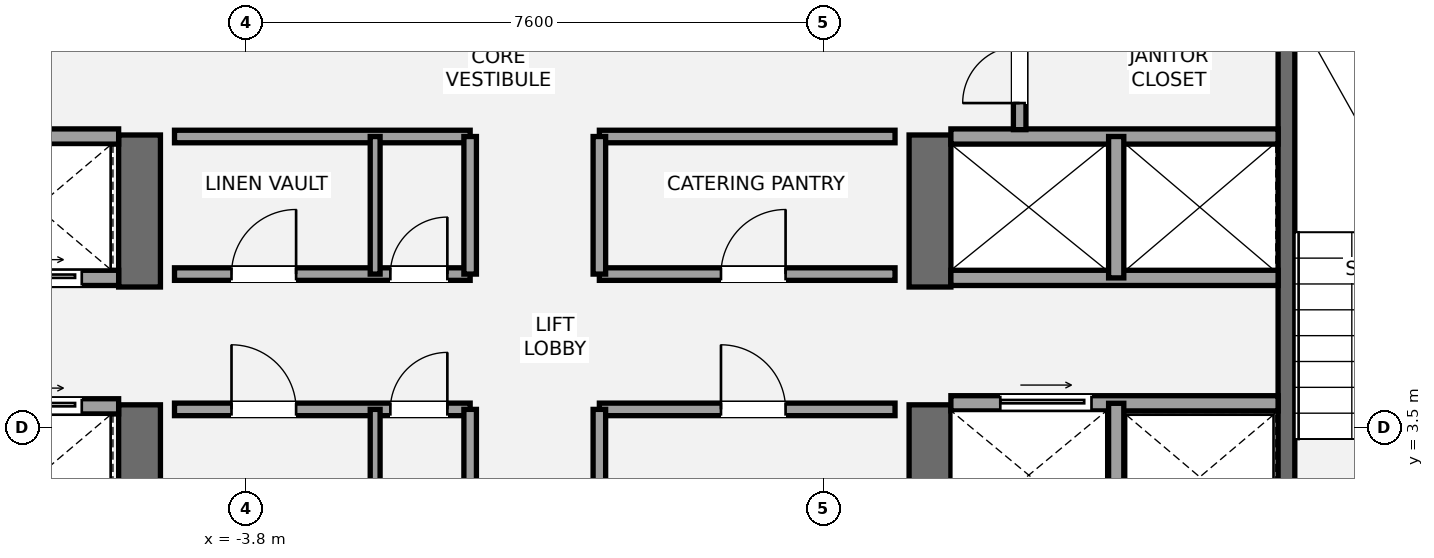
"""IFC4 building model, lengths in metres.
Left out: names, types, materials, properties, quantities, classifications, styles, units other than length and angle.
Written with IfcOpenShell. Run it as: python <this file> out.ifc"""

import sys

from ifc_helpers import new_model, si_unit, direction, frame, frame_2d, origin, place, context, subcontext, project, spatial, rectangle, extrude, element, fill, save


model = new_model("IFC4")
c1 = context("Model", 3, precision=1e-05, world=origin(), true_north=direction((0.0, 1.0)))
c2 = subcontext(c1, "Body", "Model", "MODEL_VIEW")
j1 = project(units=[si_unit("LENGTHUNIT", "METRE"), si_unit("PLANEANGLEUNIT", "RADIAN")], contexts=[c1])
p1 = place(None, origin())
s1 = spatial("IfcSite", under=j1, at=p1, CompositionType="ELEMENT")
p2 = place(p1, origin())
s2 = spatial("IfcBuilding", under=s1, at=p2, CompositionType="ELEMENT")
p3 = place(p2, frame((0.0, 0.0, 244.65)))
s3 = spatial("IfcBuildingStorey", under=s2, at=p3, CompositionType="ELEMENT", Elevation=244.65)
p4 = place(p3, frame((-5.2, 1.3, 0.0), z_axis=(0.0, 0.0, 1.0), x_axis=(0.0, 1.0, 0.0)))
e1 = element("IfcWall", 1, at=p4, inside=s3, PredefinedType="SHEAR", context=c2, shape_type="SweptSolid", body=[
    extrude(rectangle(XDim=2.5, YDim=0.55, at=frame_2d((1.25, 0.0))), origin(), (0.0, 0.0, 1.0), 3.15),
])
p5 = place(p3, frame((-5.2, 5.35, 0.0), z_axis=(0.0, 0.0, 1.0), x_axis=(0.0, 1.0, 0.0)))
e2 = element("IfcWall", 2, at=p5, inside=s3, PredefinedType="SHEAR", context=c2, shape_type="SweptSolid", body=[
    extrude(rectangle(XDim=2.0, YDim=0.55, at=frame_2d((1.0, 0.0))), origin(), (0.0, 0.0, 1.0), 3.15),
])
p6 = place(p3, frame((5.2, 1.3, 0.0), z_axis=(0.0, 0.0, 1.0), x_axis=(0.0, 1.0, 0.0)))
e3 = element("IfcWall", 3, at=p6, inside=s3, PredefinedType="SHEAR", context=c2, shape_type="SweptSolid", body=[
    extrude(rectangle(XDim=2.5, YDim=0.55, at=frame_2d((1.25, 0.0))), origin(), (0.0, 0.0, 1.0), 3.15),
])
p7 = place(p3, frame((5.2, 5.35, 0.0), z_axis=(0.0, 0.0, 1.0), x_axis=(0.0, 1.0, 0.0)))
e4 = element("IfcWall", 4, at=p7, inside=s3, PredefinedType="SHEAR", context=c2, shape_type="SweptSolid", body=[
    extrude(rectangle(XDim=2.0, YDim=0.55, at=frame_2d((1.0, 0.0))), origin(), (0.0, 0.0, 1.0), 3.15),
])
p8 = place(p3, frame((9.89, 1.85, 0.0), z_axis=(0.0, 0.0, 1.0), x_axis=(0.0, 1.0, 0.0)))
e5 = element("IfcWall", 5, at=p8, inside=s3, PredefinedType="SHEAR", context=c2, shape_type="SweptSolid", body=[
    extrude(rectangle(XDim=7.15, YDim=0.22, at=frame_2d((3.575, 0.0))), origin(), (0.0, 0.0, 1.0), 3.15),
])
p9 = place(p3, frame((-9.78, 3.78, 0.0), z_axis=(0.0, 0.0, 1.0), x_axis=(1.0, 0.0, 0.0)))
e6 = element("IfcWall", 6, at=p9, inside=s3, PredefinedType="SOLIDWALL", context=c2, shape_type="SweptSolid", body=[
    extrude(rectangle(XDim=4.305, YDim=0.2, at=frame_2d((2.152, 0.0))), origin(), (0.0, 0.0, 1.0), 2.97),
])
p10 = place(p9, frame((2.72, 0.0, 0.0)))
e7 = element("IfcOpeningElement", 7, at=p10, cuts=e6, PredefinedType="OPENING", context=c2, shape_type="SweptSolid", body=[
    extrude(rectangle(XDim=1.1, YDim=2.2, at=frame_2d((0.55, 1.1))), frame((0.0, 0.11, 0.0), z_axis=(0.0, -1.0, 0.0), x_axis=(1.0, 0.0, 0.0)), (0.0, 0.0, 1.0), 0.22),
])
p11 = place(p3, frame((-9.78, 5.47, 0.0), z_axis=(0.0, 0.0, 1.0), x_axis=(1.0, 0.0, 0.0)))
e8 = element("IfcWall", 8, at=p11, inside=s3, PredefinedType="SOLIDWALL", context=c2, shape_type="SweptSolid", body=[
    extrude(rectangle(XDim=4.305, YDim=0.2, at=frame_2d((2.152, 0.0))), origin(), (0.0, 0.0, 1.0), 2.97),
])
p12 = place(p11, frame((0.55, 0.0, 0.0)))
e9 = element("IfcOpeningElement", 9, at=p12, cuts=e8, PredefinedType="OPENING", context=c2, shape_type="SweptSolid", body=[
    extrude(rectangle(XDim=1.1, YDim=2.2, at=frame_2d((0.55, 1.1))), frame((0.0, 0.11, 0.0), z_axis=(0.0, -1.0, 0.0), x_axis=(1.0, 0.0, 0.0)), (0.0, 0.0, 1.0), 0.22),
])
p13 = place(p11, frame((2.72, 0.0, 0.0)))
e10 = element("IfcOpeningElement", 10, at=p13, cuts=e8, PredefinedType="OPENING", context=c2, shape_type="SweptSolid", body=[
    extrude(rectangle(XDim=1.1, YDim=2.2, at=frame_2d((0.55, 1.1))), frame((0.0, 0.11, 0.0), z_axis=(0.0, -1.0, 0.0), x_axis=(1.0, 0.0, 0.0)), (0.0, 0.0, 1.0), 0.22),
])
p14 = place(p3, frame((-9.78, 7.33, 0.0), z_axis=(0.0, 0.0, 1.0), x_axis=(1.0, 0.0, 0.0)))
e11 = element("IfcWall", 11, at=p14, inside=s3, PredefinedType="SOLIDWALL", context=c2, shape_type="SweptSolid", body=[
    extrude(rectangle(XDim=4.305, YDim=0.2, at=frame_2d((2.152, 0.0))), origin(), (0.0, 0.0, 1.0), 2.97),
])
p15 = place(p3, frame((5.475, 3.82, 0.0), z_axis=(0.0, 0.0, 1.0), x_axis=(1.0, 0.0, 0.0)))
e12 = element("IfcWall", 12, at=p15, inside=s3, PredefinedType="SOLIDWALL", context=c2, shape_type="SweptSolid", body=[
    extrude(rectangle(XDim=4.305, YDim=0.2, at=frame_2d((2.152, 0.0))), origin(), (0.0, 0.0, 1.0), 2.97),
])
p16 = place(p15, frame((0.65, 0.0, 0.0)))
e13 = element("IfcOpeningElement", 13, at=p16, cuts=e12, PredefinedType="OPENING", context=c2, shape_type="SweptSolid", body=[
    extrude(rectangle(XDim=1.2, YDim=2.2, at=frame_2d((0.6, 1.1))), frame((0.0, 0.11, 0.0), z_axis=(0.0, -1.0, 0.0), x_axis=(1.0, 0.0, 0.0)), (0.0, 0.0, 1.0), 0.22),
])
p17 = place(p3, frame((7.65, 1.85, 0.0), z_axis=(0.0, 0.0, 1.0), x_axis=(0.0, 1.0, 0.0)))
e14 = element("IfcWall", 14, at=p17, inside=s3, PredefinedType="SOLIDWALL", context=c2, shape_type="SweptSolid", body=[
    extrude(rectangle(XDim=1.97, YDim=0.2, at=frame_2d((0.985, 0.0))), origin(), (0.0, 0.0, 1.0), 2.97),
])
for number, where, z_axis, x_axis in (
    (15, (5.475, 5.47, 0.0), (0.0, 0.0, 1.0), (1.0, 0.0, 0.0)),
    (16, (5.475, 7.33, 0.0), (0.0, 0.0, 1.0), (1.0, 0.0, 0.0)),
):
    element("IfcWall", number, at=place(p3, frame(where, z_axis=z_axis, x_axis=x_axis)), inside=s3, PredefinedType="SOLIDWALL", context=c2, shape_type="SweptSolid", body=[
        extrude(rectangle(XDim=4.305, YDim=0.2, at=frame_2d((2.152, 0.0))), origin(), (0.0, 0.0, 1.0), 2.97),
    ])
p18 = place(p3, frame((7.65, 5.47, 0.0), z_axis=(0.0, 0.0, 1.0), x_axis=(0.0, 1.0, 0.0)))
e17 = element("IfcWall", 17, at=p18, inside=s3, PredefinedType="SOLIDWALL", context=c2, shape_type="SweptSolid", body=[
    extrude(rectangle(XDim=1.86, YDim=0.2, at=frame_2d((0.93, 0.0))), origin(), (0.0, 0.0, 1.0), 2.97),
])
p19 = place(p3, frame((-4.74, 3.74, 0.0), z_axis=(0.0, 0.0, 1.0), x_axis=(1.0, 0.0, 0.0)))
e18 = element("IfcWall", 18, at=p19, inside=s3, PredefinedType="PARTITIONING", context=c2, shape_type="SweptSolid", body=[
    extrude(rectangle(XDim=3.89, YDim=0.165, at=frame_2d((1.945, 0.0))), origin(), (0.0, 0.0, 1.0), 2.97),
])
p20 = place(p19, frame((0.75, 0.0, 0.0)))
e19 = element("IfcOpeningElement", 19, at=p20, cuts=e18, PredefinedType="OPENING", context=c2, shape_type="SweptSolid", body=[
    extrude(rectangle(XDim=0.85, YDim=2.1, at=frame_2d((0.425, 1.05))), frame((0.0, 0.093, 0.0), z_axis=(0.0, -1.0, 0.0), x_axis=(1.0, 0.0, 0.0)), (0.0, 0.0, 1.0), 0.185),
])
p21 = place(p19, frame((2.84, 0.0, 0.0)))
e20 = element("IfcOpeningElement", 20, at=p21, cuts=e18, PredefinedType="OPENING", context=c2, shape_type="SweptSolid", body=[
    extrude(rectangle(XDim=0.75, YDim=2.1, at=frame_2d((0.375, 1.05))), frame((0.0, 0.093, 0.0), z_axis=(0.0, -1.0, 0.0), x_axis=(1.0, 0.0, 0.0)), (0.0, 0.0, 1.0), 0.185),
])
p22 = place(p3, frame((-0.85, 1.92, 0.0), z_axis=(0.0, 0.0, 1.0), x_axis=(0.0, 1.0, 0.0)))
e21 = element("IfcWall", 21, at=p22, inside=s3, PredefinedType="PARTITIONING", context=c2, shape_type="SweptSolid", body=[
    extrude(rectangle(XDim=1.82, YDim=0.165, at=frame_2d((0.91, 0.0))), origin(), (0.0, 0.0, 1.0), 2.97),
])
p23 = place(p3, frame((0.85, 3.74, 0.0), z_axis=(0.0, 0.0, 1.0), x_axis=(1.0, 0.0, 0.0)))
e22 = element("IfcWall", 22, at=p23, inside=s3, PredefinedType="PARTITIONING", context=c2, shape_type="SweptSolid", body=[
    extrude(rectangle(XDim=3.89, YDim=0.165, at=frame_2d((1.945, 0.0))), origin(), (0.0, 0.0, 1.0), 2.97),
])
p24 = place(p23, frame((1.6, 0.0, 0.0)))
e23 = element("IfcOpeningElement", 23, at=p24, cuts=e22, PredefinedType="OPENING", context=c2, shape_type="SweptSolid", body=[
    extrude(rectangle(XDim=0.85, YDim=2.1, at=frame_2d((0.425, 1.05))), frame((0.0, 0.093, 0.0), z_axis=(0.0, -1.0, 0.0), x_axis=(1.0, 0.0, 0.0)), (0.0, 0.0, 1.0), 0.185),
])
p25 = place(p3, frame((0.85, 1.92, 0.0), z_axis=(0.0, 0.0, 1.0), x_axis=(0.0, 1.0, 0.0)))
e24 = element("IfcWall", 24, at=p25, inside=s3, PredefinedType="PARTITIONING", context=c2, shape_type="SweptSolid", body=[
    extrude(rectangle(XDim=1.82, YDim=0.165, at=frame_2d((0.91, 0.0))), origin(), (0.0, 0.0, 1.0), 2.97),
])
p26 = place(p3, frame((-2.1, 1.92, 0.0), z_axis=(0.0, 0.0, 1.0), x_axis=(0.0, 1.0, 0.0)))
e25 = element("IfcWall", 25, at=p26, inside=s3, PredefinedType="PARTITIONING", context=c2, shape_type="SweptSolid", body=[
    extrude(rectangle(XDim=1.82, YDim=0.13, at=frame_2d((0.91, 0.0))), origin(), (0.0, 0.0, 1.0), 2.97),
])
p27 = place(p3, frame((-4.74, 5.52, 0.0), z_axis=(0.0, 0.0, 1.0), x_axis=(1.0, 0.0, 0.0)))
e26 = element("IfcWall", 26, at=p27, inside=s3, PredefinedType="PARTITIONING", context=c2, shape_type="SweptSolid", body=[
    extrude(rectangle(XDim=3.89, YDim=0.165, at=frame_2d((1.945, 0.0))), origin(), (0.0, 0.0, 1.0), 2.97),
])
p28 = place(p27, frame((0.75, 0.0, 0.0)))
e27 = element("IfcOpeningElement", 27, at=p28, cuts=e26, PredefinedType="OPENING", context=c2, shape_type="SweptSolid", body=[
    extrude(rectangle(XDim=0.85, YDim=2.1, at=frame_2d((0.425, 1.05))), frame((0.0, 0.093, 0.0), z_axis=(0.0, -1.0, 0.0), x_axis=(1.0, 0.0, 0.0)), (0.0, 0.0, 1.0), 0.185),
])
p29 = place(p27, frame((2.84, 0.0, 0.0)))
e28 = element("IfcOpeningElement", 28, at=p29, cuts=e26, PredefinedType="OPENING", context=c2, shape_type="SweptSolid", body=[
    extrude(rectangle(XDim=0.75, YDim=2.1, at=frame_2d((0.375, 1.05))), frame((0.0, 0.093, 0.0), z_axis=(0.0, -1.0, 0.0), x_axis=(1.0, 0.0, 0.0)), (0.0, 0.0, 1.0), 0.185),
])
p30 = place(p3, frame((-4.74, 7.33, 0.0), z_axis=(0.0, 0.0, 1.0), x_axis=(1.0, 0.0, 0.0)))
e29 = element("IfcWall", 29, at=p30, inside=s3, PredefinedType="PARTITIONING", context=c2, shape_type="SweptSolid", body=[
    extrude(rectangle(XDim=3.89, YDim=0.165, at=frame_2d((1.945, 0.0))), origin(), (0.0, 0.0, 1.0), 2.97),
])
p31 = place(p3, frame((-0.85, 5.52, 0.0), z_axis=(0.0, 0.0, 1.0), x_axis=(0.0, 1.0, 0.0)))
e30 = element("IfcWall", 30, at=p31, inside=s3, PredefinedType="PARTITIONING", context=c2, shape_type="SweptSolid", body=[
    extrude(rectangle(XDim=1.81, YDim=0.165, at=frame_2d((0.905, 0.0))), origin(), (0.0, 0.0, 1.0), 2.97),
])
p32 = place(p3, frame((0.85, 5.52, 0.0), z_axis=(0.0, 0.0, 1.0), x_axis=(1.0, 0.0, 0.0)))
e31 = element("IfcWall", 31, at=p32, inside=s3, PredefinedType="PARTITIONING", context=c2, shape_type="SweptSolid", body=[
    extrude(rectangle(XDim=3.89, YDim=0.165, at=frame_2d((1.945, 0.0))), origin(), (0.0, 0.0, 1.0), 2.97),
])
p33 = place(p32, frame((1.6, 0.0, 0.0)))
e32 = element("IfcOpeningElement", 32, at=p33, cuts=e31, PredefinedType="OPENING", context=c2, shape_type="SweptSolid", body=[
    extrude(rectangle(XDim=0.85, YDim=2.1, at=frame_2d((0.425, 1.05))), frame((0.0, 0.093, 0.0), z_axis=(0.0, -1.0, 0.0), x_axis=(1.0, 0.0, 0.0)), (0.0, 0.0, 1.0), 0.185),
])
p34 = place(p3, frame((0.85, 7.33, 0.0), z_axis=(0.0, 0.0, 1.0), x_axis=(1.0, 0.0, 0.0)))
e33 = element("IfcWall", 33, at=p34, inside=s3, PredefinedType="PARTITIONING", context=c2, shape_type="SweptSolid", body=[
    extrude(rectangle(XDim=3.89, YDim=0.165, at=frame_2d((1.945, 0.0))), origin(), (0.0, 0.0, 1.0), 2.97),
])
p35 = place(p3, frame((0.85, 5.52, 0.0), z_axis=(0.0, 0.0, 1.0), x_axis=(0.0, 1.0, 0.0)))
e34 = element("IfcWall", 34, at=p35, inside=s3, PredefinedType="PARTITIONING", context=c2, shape_type="SweptSolid", body=[
    extrude(rectangle(XDim=1.81, YDim=0.165, at=frame_2d((0.905, 0.0))), origin(), (0.0, 0.0, 1.0), 2.97),
])
p36 = place(p3, frame((-2.1, 5.52, 0.0), z_axis=(0.0, 0.0, 1.0), x_axis=(0.0, 1.0, 0.0)))
e35 = element("IfcWall", 35, at=p36, inside=s3, PredefinedType="PARTITIONING", context=c2, shape_type="SweptSolid", body=[
    extrude(rectangle(XDim=1.81, YDim=0.13, at=frame_2d((0.905, 0.0))), origin(), (0.0, 0.0, 1.0), 2.97),
])
p37 = place(p3, frame((6.38, 7.42, 0.0), z_axis=(0.0, 0.0, 1.0), x_axis=(0.0, 1.0, 0.0)))
e36 = element("IfcWall", 36, at=p37, inside=s3, PredefinedType="PARTITIONING", context=c2, shape_type="SweptSolid", body=[
    extrude(rectangle(XDim=1.58, YDim=0.165, at=frame_2d((0.79, 0.0))), origin(), (0.0, 0.0, 1.0), 2.97),
])
p38 = place(p37, frame((0.35, 0.0, 0.0)))
e37 = element("IfcOpeningElement", 37, at=p38, cuts=e36, PredefinedType="OPENING", context=c2, shape_type="SweptSolid", body=[
    extrude(rectangle(XDim=0.75, YDim=2.1, at=frame_2d((0.375, 1.05))), frame((0.0, 0.093, 0.0), z_axis=(0.0, -1.0, 0.0), x_axis=(1.0, 0.0, 0.0)), (0.0, 0.0, 1.0), 0.185),
])
p39 = place(p13, origin())
e38 = element("IfcDoor", 38, at=p39, inside=s3, OperationType="SLIDING_TO_LEFT", PredefinedType="DOOR", context=c2, shape_type="SweptSolid", body=[
    extrude(rectangle(XDim=1.1, YDim=2.2, at=frame_2d((0.55, 1.1))), frame((0.0, 0.025, 0.0), z_axis=(0.0, -1.0, 0.0), x_axis=(1.0, 0.0, 0.0)), (0.0, 0.0, 1.0), 0.05),
])
fill(e10, e38)
p40 = place(p10, origin())
e39 = element("IfcDoor", 39, at=p40, inside=s3, OperationType="SLIDING_TO_LEFT", PredefinedType="DOOR", context=c2, shape_type="SweptSolid", body=[
    extrude(rectangle(XDim=1.1, YDim=2.2, at=frame_2d((0.55, 1.1))), frame((0.0, 0.025, 0.0), z_axis=(0.0, -1.0, 0.0), x_axis=(1.0, 0.0, 0.0)), (0.0, 0.0, 1.0), 0.05),
])
fill(e7, e39)
p41 = place(p16, origin())
e40 = element("IfcDoor", 40, at=p41, inside=s3, OperationType="SLIDING_TO_RIGHT", PredefinedType="DOOR", context=c2, shape_type="SweptSolid", body=[
    extrude(rectangle(XDim=1.2, YDim=2.2, at=frame_2d((0.6, 1.1))), frame((0.0, 0.025, 0.0), z_axis=(0.0, -1.0, 0.0), x_axis=(1.0, 0.0, 0.0)), (0.0, 0.0, 1.0), 0.05),
])
fill(e13, e40)
p42 = place(p20, origin())
e41 = element("IfcDoor", 41, at=p42, inside=s3, OperationType="SINGLE_SWING_LEFT", PredefinedType="DOOR", context=c2, shape_type="SweptSolid", body=[
    extrude(rectangle(XDim=0.85, YDim=2.1, at=frame_2d((0.425, 1.05))), frame((0.0, 0.025, 0.0), z_axis=(0.0, -1.0, 0.0), x_axis=(1.0, 0.0, 0.0)), (0.0, 0.0, 1.0), 0.05),
])
fill(e19, e41)
p43 = place(p21, origin())
e42 = element("IfcDoor", 42, at=p43, inside=s3, OperationType="SINGLE_SWING_RIGHT", PredefinedType="DOOR", context=c2, shape_type="SweptSolid", body=[
    extrude(rectangle(XDim=0.75, YDim=2.1, at=frame_2d((0.375, 1.05))), frame((0.0, 0.025, 0.0), z_axis=(0.0, -1.0, 0.0), x_axis=(1.0, 0.0, 0.0)), (0.0, 0.0, 1.0), 0.05),
])
fill(e20, e42)
p44 = place(p24, origin())
e43 = element("IfcDoor", 43, at=p44, inside=s3, OperationType="SINGLE_SWING_LEFT", PredefinedType="DOOR", context=c2, shape_type="SweptSolid", body=[
    extrude(rectangle(XDim=0.85, YDim=2.1, at=frame_2d((0.425, 1.05))), frame((0.0, 0.025, 0.0), z_axis=(0.0, -1.0, 0.0), x_axis=(1.0, 0.0, 0.0)), (0.0, 0.0, 1.0), 0.05),
])
fill(e23, e43)
p45 = place(p28, origin())
e44 = element("IfcDoor", 44, at=p45, inside=s3, OperationType="SINGLE_SWING_RIGHT", PredefinedType="DOOR", context=c2, shape_type="SweptSolid", body=[
    extrude(rectangle(XDim=0.85, YDim=2.1, at=frame_2d((0.425, 1.05))), frame((0.0, 0.025, 0.0), z_axis=(0.0, -1.0, 0.0), x_axis=(1.0, 0.0, 0.0)), (0.0, 0.0, 1.0), 0.05),
])
fill(e27, e44)
p46 = place(p29, origin())
e45 = element("IfcDoor", 45, at=p46, inside=s3, OperationType="SINGLE_SWING_RIGHT", PredefinedType="DOOR", context=c2, shape_type="SweptSolid", body=[
    extrude(rectangle(XDim=0.75, YDim=2.1, at=frame_2d((0.375, 1.05))), frame((0.0, 0.025, 0.0), z_axis=(0.0, -1.0, 0.0), x_axis=(1.0, 0.0, 0.0)), (0.0, 0.0, 1.0), 0.05),
])
fill(e28, e45)
p47 = place(p33, origin())
e46 = element("IfcDoor", 46, at=p47, inside=s3, OperationType="SINGLE_SWING_RIGHT", PredefinedType="DOOR", context=c2, shape_type="SweptSolid", body=[
    extrude(rectangle(XDim=0.85, YDim=2.1, at=frame_2d((0.425, 1.05))), frame((0.0, 0.025, 0.0), z_axis=(0.0, -1.0, 0.0), x_axis=(1.0, 0.0, 0.0)), (0.0, 0.0, 1.0), 0.05),
])
fill(e32, e46)
p48 = place(p38, origin())
e47 = element("IfcDoor", 47, at=p48, inside=s3, OperationType="SINGLE_SWING_LEFT", PredefinedType="DOOR", context=c2, shape_type="SweptSolid", body=[
    extrude(rectangle(XDim=0.75, YDim=2.1, at=frame_2d((0.375, 1.05))), frame((0.0, 0.025, 0.0), z_axis=(0.0, -1.0, 0.0), x_axis=(1.0, 0.0, 0.0)), (0.0, 0.0, 1.0), 0.05),
])
fill(e37, e47)
save(model, sys.argv[1])
